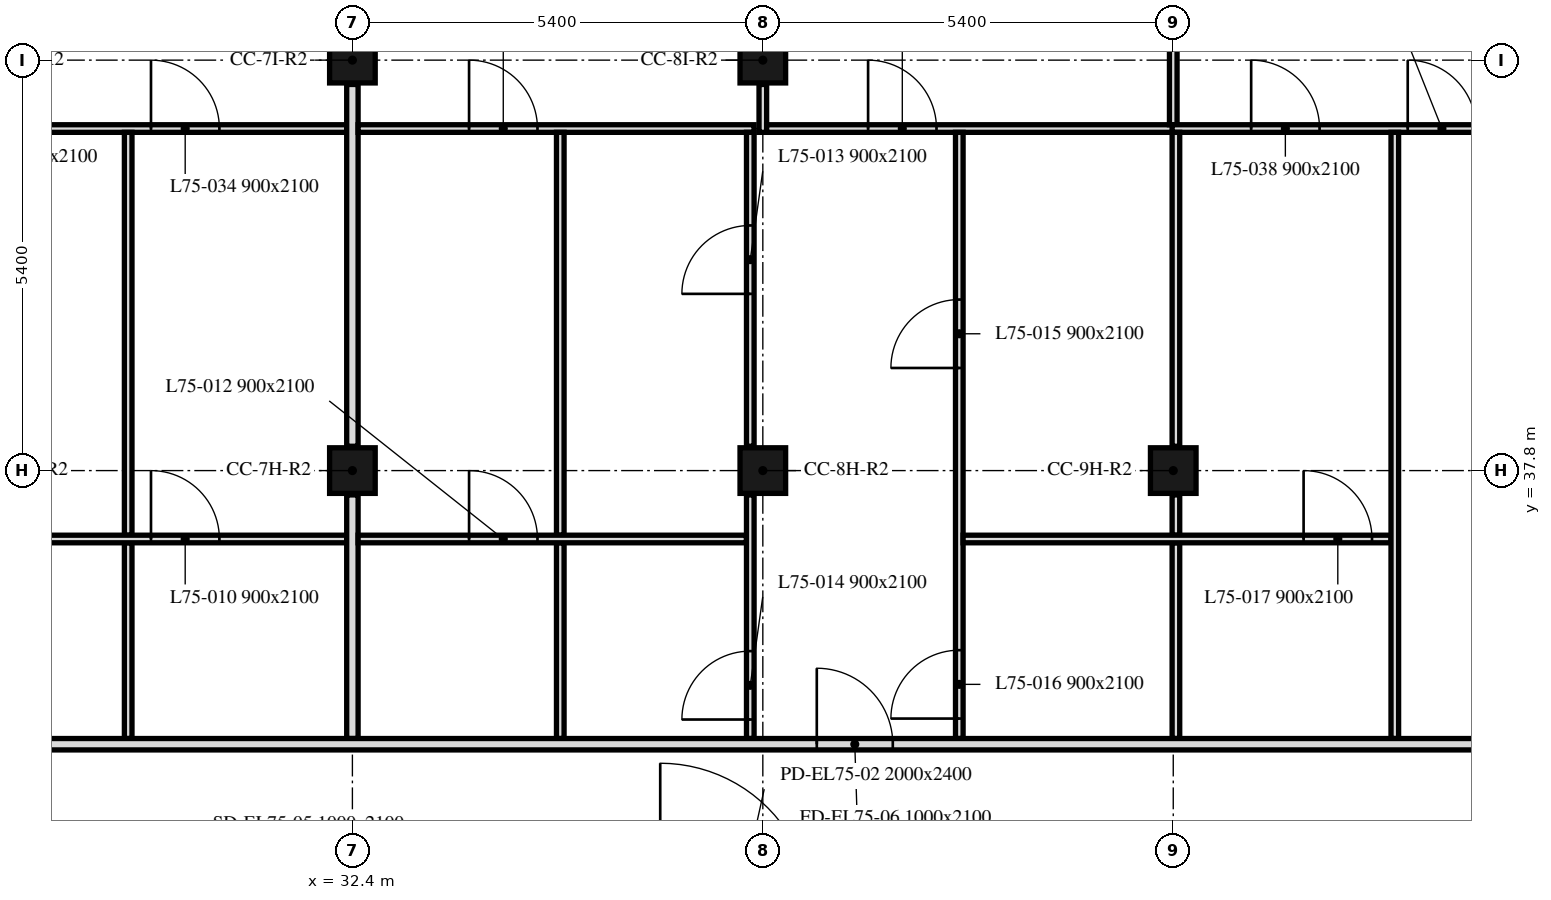
"""IFC4 building model, lengths in metres.
Left out: names, types, materials, properties, quantities, classifications, styles, units other than length and angle.
Written with IfcOpenShell. Run it as: python <this file> out.ifc"""

import sys

from ifc_helpers import new_model, si_unit, direction, frame, frame_2d, origin, origin_2d, place, context, subcontext, project, spatial, rectangle, extrude, element, fill, save


model = new_model("IFC4")
c1 = context("Model", 3, precision=1e-05, world=origin(), true_north=direction((0.0, 1.0)))
c2 = subcontext(c1, "Body", "Model", "MODEL_VIEW")
j1 = project(units=[si_unit("LENGTHUNIT", "METRE"), si_unit("PLANEANGLEUNIT", "RADIAN")], contexts=[c1])
p1 = place(None, origin())
s1 = spatial("IfcSite", under=j1, at=p1, CompositionType="ELEMENT")
p2 = place(p1, origin())
s2 = spatial("IfcBuilding", under=s1, at=p2, CompositionType="ELEMENT")
p3 = place(p2, frame((0.0, 0.0, 301.6)))
s3 = spatial("IfcBuildingStorey", under=s2, at=p3, CompositionType="ELEMENT", Elevation=301.6)
for number, where, z_axis, x_axis in (
    (1, (32.4, 37.8, 0.0), (0.0, 0.0, 1.0), (1.0, 0.0, 0.0)),
    (2, (37.8, 37.8, 0.0), (0.0, 0.0, 1.0), (1.0, 0.0, 0.0)),
    (3, (43.2, 37.8, 0.0), (0.0, 0.0, 1.0), (1.0, 0.0, 0.0)),
    (4, (32.4, 43.2, 0.0), (0.0, 0.0, 1.0), (1.0, 0.0, 0.0)),
    (5, (37.8, 43.2, 0.0), (0.0, 0.0, 1.0), (1.0, 0.0, 0.0)),
):
    element("IfcColumn", number, at=place(p3, frame(where, z_axis=z_axis, x_axis=x_axis)), inside=s3, PredefinedType="COLUMN", context=c2, shape_type="SweptSolid", body=[
        extrude(rectangle(XDim=0.6, YDim=0.6, at=origin_2d()), origin(), (0.0, 0.0, 1.0), 3.0),
    ])
p4 = place(p3, frame((47.901, 43.051, 0.0), z_axis=(0.0, 0.0, 1.0), x_axis=(-0.707106781187, 0.707106781187, 0.0)))
e6 = element("IfcWall", 6, at=p4, inside=s3, PredefinedType="SOLIDWALL", context=c2, shape_type="SweptSolid", body=[
    extrude(rectangle(XDim=6.86, YDim=0.3, at=frame_2d((3.43, 0.0))), origin(), (0.0, 0.0, 1.0), 3.0),
])
p5 = place(p4, frame((1.73, 0.0, 0.9)))
e7 = element("IfcOpeningElement", 7, at=p5, cuts=e6, PredefinedType="OPENING", context=c2, shape_type="SweptSolid", body=[
    extrude(rectangle(XDim=3.4, YDim=1.7, at=frame_2d((1.7, 0.85))), frame((0.0, 0.16, 0.0), z_axis=(0.0, -1.0, 0.0), x_axis=(1.0, 0.0, 0.0)), (0.0, 0.0, 1.0), 0.32),
])
p6 = place(p3, frame((27.05, 42.3, 0.0), z_axis=(0.0, 0.0, 1.0), x_axis=(1.0, 0.0, 0.0)))
e8 = element("IfcWall", 8, at=p6, inside=s3, PredefinedType="PARTITIONING", context=c2, shape_type="SweptSolid", body=[
    extrude(rectangle(XDim=5.275, YDim=0.1, at=frame_2d((2.637, 0.0))), origin(), (0.0, 0.0, 1.0), 3.0),
])
p7 = place(p6, frame((2.7, 0.0, 0.0)))
e9 = element("IfcOpeningElement", 9, at=p7, cuts=e8, PredefinedType="OPENING", context=c2, shape_type="SweptSolid", body=[
    extrude(rectangle(XDim=0.9, YDim=2.1, at=frame_2d((0.45, 1.05))), frame((0.0, 0.05, 0.0), z_axis=(0.0, -1.0, 0.0), x_axis=(1.0, 0.0, 0.0)), (0.0, 0.0, 1.0), 0.1),
])
p8 = place(p3, frame((29.45, 36.95, 0.0), z_axis=(0.0, 0.0, 1.0), x_axis=(0.0, 1.0, 0.0)))
e10 = element("IfcWall", 10, at=p8, inside=s3, PredefinedType="PARTITIONING", context=c2, shape_type="SweptSolid", body=[
    extrude(rectangle(XDim=5.3, YDim=0.1, at=frame_2d((2.65, 0.0))), origin(), (0.0, 0.0, 1.0), 3.0),
])
p9 = place(p3, frame((29.45, 34.275, 0.0), z_axis=(0.0, 0.0, 1.0), x_axis=(0.0, 1.0, 0.0)))
e11 = element("IfcWall", 11, at=p9, inside=s3, PredefinedType="PARTITIONING", context=c2, shape_type="SweptSolid", body=[
    extrude(rectangle(XDim=2.575, YDim=0.1, at=frame_2d((1.288, 0.0))), origin(), (0.0, 0.0, 1.0), 3.0),
])
p10 = place(p3, frame((26.772, 36.9, 0.0), z_axis=(0.0, 0.0, 1.0), x_axis=(1.0, 0.0, 0.0)))
e12 = element("IfcWall", 12, at=p10, inside=s3, PredefinedType="PARTITIONING", context=c2, shape_type="SweptSolid", body=[
    extrude(rectangle(XDim=5.553, YDim=0.1, at=frame_2d((2.776, 0.0))), origin(), (0.0, 0.0, 1.0), 2.4),
])
p11 = place(p10, frame((2.978, 0.0, 0.0)))
e13 = element("IfcOpeningElement", 13, at=p11, cuts=e12, PredefinedType="OPENING", context=c2, shape_type="SweptSolid", body=[
    extrude(rectangle(XDim=0.9, YDim=2.1, at=frame_2d((0.45, 1.05))), frame((0.0, 0.05, 0.0), z_axis=(0.0, -1.0, 0.0), x_axis=(1.0, 0.0, 0.0)), (0.0, 0.0, 1.0), 0.1),
])
p12 = place(p3, frame((32.4, 38.12, 0.0), z_axis=(0.0, 0.0, 1.0), x_axis=(0.0, 1.0, 0.0)))
e14 = element("IfcWall", 14, at=p12, inside=s3, PredefinedType="PARTITIONING", context=c2, shape_type="SweptSolid", body=[
    extrude(rectangle(XDim=4.76, YDim=0.15, at=frame_2d((2.38, 0.0))), origin(), (0.0, 0.0, 1.0), 2.4),
])
p13 = place(p3, frame((32.4, 34.275, 0.0), z_axis=(0.0, 0.0, 1.0), x_axis=(0.0, 1.0, 0.0)))
e15 = element("IfcWall", 15, at=p13, inside=s3, PredefinedType="PARTITIONING", context=c2, shape_type="SweptSolid", body=[
    extrude(rectangle(XDim=3.205, YDim=0.15, at=frame_2d((1.603, 0.0))), origin(), (0.0, 0.0, 1.0), 2.4),
])
p14 = place(p3, frame((32.475, 42.3, 0.0), z_axis=(0.0, 0.0, 1.0), x_axis=(1.0, 0.0, 0.0)))
e16 = element("IfcWall", 16, at=p14, inside=s3, PredefinedType="PARTITIONING", context=c2, shape_type="SweptSolid", body=[
    extrude(rectangle(XDim=5.21, YDim=0.1, at=frame_2d((2.605, 0.0))), origin(), (0.0, 0.0, 1.0), 3.0),
])
p15 = place(p14, frame((1.46, 0.0, 0.0)))
e17 = element("IfcOpeningElement", 17, at=p15, cuts=e16, PredefinedType="OPENING", context=c2, shape_type="SweptSolid", body=[
    extrude(rectangle(XDim=0.9, YDim=2.1, at=frame_2d((0.45, 1.05))), frame((0.0, 0.05, 0.0), z_axis=(0.0, -1.0, 0.0), x_axis=(1.0, 0.0, 0.0)), (0.0, 0.0, 1.0), 0.1),
])
p16 = place(p3, frame((37.8, 42.25, 0.0), z_axis=(0.0, 0.0, 1.0), x_axis=(0.0, 1.0, 0.0)))
e18 = element("IfcWall", 18, at=p16, inside=s3, PredefinedType="PARTITIONING", context=c2, shape_type="SweptSolid", body=[
    extrude(rectangle(XDim=0.63, YDim=0.1, at=frame_2d((0.315, 0.0))), origin(), (0.0, 0.0, 1.0), 2.4),
])
p17 = place(p3, frame((37.85, 42.3, 0.0), z_axis=(0.0, 0.0, 1.0), x_axis=(1.0, 0.0, 0.0)))
e19 = element("IfcWall", 19, at=p17, inside=s3, PredefinedType="PARTITIONING", context=c2, shape_type="SweptSolid", body=[
    extrude(rectangle(XDim=5.4, YDim=0.1, at=frame_2d((2.7, 0.0))), origin(), (0.0, 0.0, 1.0), 3.0),
])
p18 = place(p17, frame((1.335, 0.0, 0.0)))
e20 = element("IfcOpeningElement", 20, at=p18, cuts=e19, PredefinedType="OPENING", context=c2, shape_type="SweptSolid", body=[
    extrude(rectangle(XDim=0.9, YDim=2.1, at=frame_2d((0.45, 1.05))), frame((0.0, 0.05, 0.0), z_axis=(0.0, -1.0, 0.0), x_axis=(1.0, 0.0, 0.0)), (0.0, 0.0, 1.0), 0.1),
])
p19 = place(p3, frame((43.2, 42.35, 0.0), z_axis=(0.0, 0.0, 1.0), x_axis=(0.0, 1.0, 0.0)))
e21 = element("IfcWall", 21, at=p19, inside=s3, PredefinedType="PARTITIONING", context=c2, shape_type="SweptSolid", body=[
    extrude(rectangle(XDim=5.138, YDim=0.1, at=frame_2d((2.569, 0.0))), origin(), (0.0, 0.0, 1.0), 3.0),
])
p20 = place(p19, frame((2.65, 0.0, 0.0)))
e22 = element("IfcOpeningElement", 22, at=p20, cuts=e21, PredefinedType="OPENING", context=c2, shape_type="SweptSolid", body=[
    extrude(rectangle(XDim=0.9, YDim=2.1, at=frame_2d((0.45, 1.05))), frame((0.0, 0.05, 0.0), z_axis=(0.0, -1.0, 0.0), x_axis=(1.0, 0.0, 0.0)), (0.0, 0.0, 1.0), 0.1),
])
p21 = place(p3, frame((43.185, 42.3, 0.0), z_axis=(0.0, 0.0, 1.0), x_axis=(1.0, 0.0, 0.0)))
e23 = element("IfcWall", 23, at=p21, inside=s3, PredefinedType="PARTITIONING", context=c2, shape_type="SweptSolid", body=[
    extrude(rectangle(XDim=4.664, YDim=0.1, at=frame_2d((2.332, 0.0))), origin(), (0.0, 0.0, 1.0), 3.0),
])
p22 = place(p21, frame((3.1, 0.0, 0.0)))
e24 = element("IfcOpeningElement", 24, at=p22, cuts=e23, PredefinedType="OPENING", context=c2, shape_type="SweptSolid", body=[
    extrude(rectangle(XDim=0.9, YDim=2.1, at=frame_2d((0.45, 1.05))), frame((0.0, 0.05, 0.0), z_axis=(0.0, -1.0, 0.0), x_axis=(1.0, 0.0, 0.0)), (0.0, 0.0, 1.0), 0.1),
])
p23 = place(p21, frame((1.04, 0.0, 0.0)))
e25 = element("IfcOpeningElement", 25, at=p23, cuts=e23, PredefinedType="OPENING", context=c2, shape_type="SweptSolid", body=[
    extrude(rectangle(XDim=0.9, YDim=2.1, at=frame_2d((0.45, 1.05))), frame((0.0, 0.05, 0.0), z_axis=(0.0, -1.0, 0.0), x_axis=(1.0, 0.0, 0.0)), (0.0, 0.0, 1.0), 0.1),
])
p24 = place(p3, frame((35.135, 36.95, 0.0), z_axis=(0.0, 0.0, 1.0), x_axis=(0.0, 1.0, 0.0)))
e26 = element("IfcWall", 26, at=p24, inside=s3, PredefinedType="PARTITIONING", context=c2, shape_type="SweptSolid", body=[
    extrude(rectangle(XDim=5.3, YDim=0.1, at=frame_2d((2.65, 0.0))), origin(), (0.0, 0.0, 1.0), 2.4),
])
p25 = place(p3, frame((35.135, 34.275, 0.0), z_axis=(0.0, 0.0, 1.0), x_axis=(0.0, 1.0, 0.0)))
e27 = element("IfcWall", 27, at=p25, inside=s3, PredefinedType="PARTITIONING", context=c2, shape_type="SweptSolid", body=[
    extrude(rectangle(XDim=2.575, YDim=0.1, at=frame_2d((1.288, 0.0))), origin(), (0.0, 0.0, 1.0), 3.0),
])
p26 = place(p3, frame((32.475, 36.9, 0.0), z_axis=(0.0, 0.0, 1.0), x_axis=(1.0, 0.0, 0.0)))
e28 = element("IfcWall", 28, at=p26, inside=s3, PredefinedType="PARTITIONING", context=c2, shape_type="SweptSolid", body=[
    extrude(rectangle(XDim=5.11, YDim=0.1, at=frame_2d((2.555, 0.0))), origin(), (0.0, 0.0, 1.0), 3.0),
])
p27 = place(p26, frame((1.46, 0.0, 0.0)))
e29 = element("IfcOpeningElement", 29, at=p27, cuts=e28, PredefinedType="OPENING", context=c2, shape_type="SweptSolid", body=[
    extrude(rectangle(XDim=0.9, YDim=2.1, at=frame_2d((0.45, 1.05))), frame((0.0, 0.05, 0.0), z_axis=(0.0, -1.0, 0.0), x_axis=(1.0, 0.0, 0.0)), (0.0, 0.0, 1.0), 0.1),
])
p28 = place(p3, frame((37.635, 38.12, 0.0), z_axis=(0.0, 0.0, 1.0), x_axis=(0.0, 1.0, 0.0)))
e30 = element("IfcWall", 30, at=p28, inside=s3, PredefinedType="PARTITIONING", context=c2, shape_type="SweptSolid", body=[
    extrude(rectangle(XDim=4.13, YDim=0.1, at=frame_2d((2.065, 0.0))), origin(), (0.0, 0.0, 1.0), 2.4),
])
p29 = place(p28, frame((2.005, 0.0, 0.0)))
e31 = element("IfcOpeningElement", 31, at=p29, cuts=e30, PredefinedType="OPENING", context=c2, shape_type="SweptSolid", body=[
    extrude(rectangle(XDim=0.9, YDim=2.1, at=frame_2d((0.45, 1.05))), frame((0.0, 0.05, 0.0), z_axis=(0.0, -1.0, 0.0), x_axis=(1.0, 0.0, 0.0)), (0.0, 0.0, 1.0), 0.1),
])
p30 = place(p3, frame((37.635, 34.275, 0.0), z_axis=(0.0, 0.0, 1.0), x_axis=(0.0, 1.0, 0.0)))
e32 = element("IfcWall", 32, at=p30, inside=s3, PredefinedType="PARTITIONING", context=c2, shape_type="SweptSolid", body=[
    extrude(rectangle(XDim=3.205, YDim=0.1, at=frame_2d((1.603, 0.0))), origin(), (0.0, 0.0, 1.0), 2.4),
])
p31 = place(p30, frame((0.25, 0.0, 0.0)))
e33 = element("IfcOpeningElement", 33, at=p31, cuts=e32, PredefinedType="OPENING", context=c2, shape_type="SweptSolid", body=[
    extrude(rectangle(XDim=0.9, YDim=2.1, at=frame_2d((0.45, 1.05))), frame((0.0, 0.05, 0.0), z_axis=(0.0, -1.0, 0.0), x_axis=(1.0, 0.0, 0.0)), (0.0, 0.0, 1.0), 0.1),
])
p32 = place(p3, frame((40.385, 34.275, 0.0), z_axis=(0.0, 0.0, 1.0), x_axis=(0.0, 1.0, 0.0)))
e34 = element("IfcWall", 34, at=p32, inside=s3, PredefinedType="PARTITIONING", context=c2, shape_type="SweptSolid", body=[
    extrude(rectangle(XDim=7.975, YDim=0.1, at=frame_2d((3.988, 0.0))), origin(), (0.0, 0.0, 1.0), 2.4),
])
p33 = place(p32, frame((4.875, 0.0, 0.0)))
e35 = element("IfcOpeningElement", 35, at=p33, cuts=e34, PredefinedType="OPENING", context=c2, shape_type="SweptSolid", body=[
    extrude(rectangle(XDim=0.9, YDim=2.1, at=frame_2d((0.45, 1.05))), frame((0.0, 0.05, 0.0), z_axis=(0.0, -1.0, 0.0), x_axis=(1.0, 0.0, 0.0)), (0.0, 0.0, 1.0), 0.1),
])
p34 = place(p32, frame((0.262, 0.0, 0.0)))
e36 = element("IfcOpeningElement", 36, at=p34, cuts=e34, PredefinedType="OPENING", context=c2, shape_type="SweptSolid", body=[
    extrude(rectangle(XDim=0.9, YDim=2.1, at=frame_2d((0.45, 1.05))), frame((0.0, 0.05, 0.0), z_axis=(0.0, -1.0, 0.0), x_axis=(1.0, 0.0, 0.0)), (0.0, 0.0, 1.0), 0.1),
])
p35 = place(p3, frame((43.235, 36.95, 0.0), z_axis=(0.0, 0.0, 1.0), x_axis=(0.0, 1.0, 0.0)))
e37 = element("IfcWall", 37, at=p35, inside=s3, PredefinedType="PARTITIONING", context=c2, shape_type="SweptSolid", body=[
    extrude(rectangle(XDim=0.53, YDim=0.1, at=frame_2d((0.265, 0.0))), origin(), (0.0, 0.0, 1.0), 3.0),
])
p36 = place(p3, frame((43.235, 38.12, 0.0), z_axis=(0.0, 0.0, 1.0), x_axis=(0.0, 1.0, 0.0)))
e38 = element("IfcWall", 38, at=p36, inside=s3, PredefinedType="PARTITIONING", context=c2, shape_type="SweptSolid", body=[
    extrude(rectangle(XDim=4.13, YDim=0.1, at=frame_2d((2.065, 0.0))), origin(), (0.0, 0.0, 1.0), 3.0),
])
p37 = place(p3, frame((43.235, 34.275, 0.0), z_axis=(0.0, 0.0, 1.0), x_axis=(0.0, 1.0, 0.0)))
e39 = element("IfcWall", 39, at=p37, inside=s3, PredefinedType="PARTITIONING", context=c2, shape_type="SweptSolid", body=[
    extrude(rectangle(XDim=2.575, YDim=0.1, at=frame_2d((1.288, 0.0))), origin(), (0.0, 0.0, 1.0), 3.0),
])
p38 = place(p3, frame((40.435, 36.9, 0.0), z_axis=(0.0, 0.0, 1.0), x_axis=(1.0, 0.0, 0.0)))
e40 = element("IfcWall", 40, at=p38, inside=s3, PredefinedType="PARTITIONING", context=c2, shape_type="SweptSolid", body=[
    extrude(rectangle(XDim=5.63, YDim=0.1, at=frame_2d((2.815, 0.0))), origin(), (0.0, 0.0, 1.0), 3.0),
])
p39 = place(p38, frame((4.48, 0.0, 0.0)))
e41 = element("IfcOpeningElement", 41, at=p39, cuts=e40, PredefinedType="OPENING", context=c2, shape_type="SweptSolid", body=[
    extrude(rectangle(XDim=0.9, YDim=2.1, at=frame_2d((0.45, 1.05))), frame((0.0, 0.05, 0.0), z_axis=(0.0, -1.0, 0.0), x_axis=(1.0, 0.0, 0.0)), (0.0, 0.0, 1.0), 0.1),
])
p40 = place(p3, frame((46.115, 34.275, 0.0), z_axis=(0.0, 0.0, 1.0), x_axis=(0.0, 1.0, 0.0)))
e42 = element("IfcWall", 42, at=p40, inside=s3, PredefinedType="PARTITIONING", context=c2, shape_type="SweptSolid", body=[
    extrude(rectangle(XDim=7.975, YDim=0.1, at=frame_2d((3.988, 0.0))), origin(), (0.0, 0.0, 1.0), 2.4),
])
p41 = place(p3, frame((6.151, 34.2, 0.0), z_axis=(0.0, 0.0, 1.0), x_axis=(1.0, 0.0, 0.0)))
e43 = element("IfcWall", 43, at=p41, inside=s3, PredefinedType="PARTITIONING", context=c2, shape_type="SweptSolid", body=[
    extrude(rectangle(XDim=41.698, YDim=0.15, at=frame_2d((20.849, 0.0))), origin(), (0.0, 0.0, 1.0), 2.4),
])
p42 = place(p41, frame((2.939, 0.0, 0.0)))
e44 = element("IfcOpeningElement", 44, at=p42, cuts=e43, PredefinedType="OPENING", context=c2, shape_type="SweptSolid", body=[
    extrude(rectangle(XDim=1.0, YDim=2.1, at=frame_2d((0.5, 1.05))), frame((0.0, 0.075, 0.0), z_axis=(0.0, -1.0, 0.0), x_axis=(1.0, 0.0, 0.0)), (0.0, 0.0, 1.0), 0.15),
])
p43 = place(p41, frame((18.121, 0.0, 0.0)))
e45 = element("IfcOpeningElement", 45, at=p43, cuts=e43, PredefinedType="OPENING", context=c2, shape_type="SweptSolid", body=[
    extrude(rectangle(XDim=1.0, YDim=2.1, at=frame_2d((0.5, 1.05))), frame((0.0, 0.075, 0.0), z_axis=(0.0, -1.0, 0.0), x_axis=(1.0, 0.0, 0.0)), (0.0, 0.0, 1.0), 0.15),
])
p44 = place(p41, frame((32.359, 0.0, 0.0)))
e46 = element("IfcOpeningElement", 46, at=p44, cuts=e43, PredefinedType="OPENING", context=c2, shape_type="SweptSolid", body=[
    extrude(rectangle(XDim=1.0, YDim=2.1, at=frame_2d((0.5, 1.05))), frame((0.0, 0.075, 0.0), z_axis=(0.0, -1.0, 0.0), x_axis=(1.0, 0.0, 0.0)), (0.0, 0.0, 1.0), 0.15),
])
p45 = place(p11, origin())
e47 = element("IfcDoor", 47, at=p45, inside=s3, OperationType="SINGLE_SWING_LEFT", PredefinedType="DOOR", context=c2, shape_type="SweptSolid", body=[
    extrude(rectangle(XDim=0.9, YDim=2.1, at=frame_2d((0.45, 1.05))), frame((0.0, 0.025, 0.0), z_axis=(0.0, -1.0, 0.0), x_axis=(1.0, 0.0, 0.0)), (0.0, 0.0, 1.0), 0.05),
])
fill(e13, e47)
p46 = place(p22, origin())
e48 = element("IfcDoor", 48, at=p46, inside=s3, OperationType="SINGLE_SWING_LEFT", PredefinedType="DOOR", context=c2, shape_type="SweptSolid", body=[
    extrude(rectangle(XDim=0.9, YDim=2.1, at=frame_2d((0.45, 1.05))), frame((0.0, 0.025, 0.0), z_axis=(0.0, -1.0, 0.0), x_axis=(1.0, 0.0, 0.0)), (0.0, 0.0, 1.0), 0.05),
])
fill(e24, e48)
p47 = place(p27, origin())
e49 = element("IfcDoor", 49, at=p47, inside=s3, OperationType="SINGLE_SWING_LEFT", PredefinedType="DOOR", context=c2, shape_type="SweptSolid", body=[
    extrude(rectangle(XDim=0.9, YDim=2.1, at=frame_2d((0.45, 1.05))), frame((0.0, 0.025, 0.0), z_axis=(0.0, -1.0, 0.0), x_axis=(1.0, 0.0, 0.0)), (0.0, 0.0, 1.0), 0.05),
])
fill(e29, e49)
p48 = place(p29, origin())
e50 = element("IfcDoor", 50, at=p48, inside=s3, OperationType="SINGLE_SWING_RIGHT", PredefinedType="DOOR", context=c2, shape_type="SweptSolid", body=[
    extrude(rectangle(XDim=0.9, YDim=2.1, at=frame_2d((0.45, 1.05))), frame((0.0, 0.025, 0.0), z_axis=(0.0, -1.0, 0.0), x_axis=(1.0, 0.0, 0.0)), (0.0, 0.0, 1.0), 0.05),
])
fill(e31, e50)
p49 = place(p31, origin())
e51 = element("IfcDoor", 51, at=p49, inside=s3, OperationType="SINGLE_SWING_LEFT", PredefinedType="DOOR", context=c2, shape_type="SweptSolid", body=[
    extrude(rectangle(XDim=0.9, YDim=2.1, at=frame_2d((0.45, 1.05))), frame((0.0, 0.025, 0.0), z_axis=(0.0, -1.0, 0.0), x_axis=(1.0, 0.0, 0.0)), (0.0, 0.0, 1.0), 0.05),
])
fill(e33, e51)
p50 = place(p33, origin())
e52 = element("IfcDoor", 52, at=p50, inside=s3, OperationType="SINGLE_SWING_LEFT", PredefinedType="DOOR", context=c2, shape_type="SweptSolid", body=[
    extrude(rectangle(XDim=0.9, YDim=2.1, at=frame_2d((0.45, 1.05))), frame((0.0, 0.025, 0.0), z_axis=(0.0, -1.0, 0.0), x_axis=(1.0, 0.0, 0.0)), (0.0, 0.0, 1.0), 0.05),
])
fill(e35, e52)
p51 = place(p34, origin())
e53 = element("IfcDoor", 53, at=p51, inside=s3, OperationType="SINGLE_SWING_LEFT", PredefinedType="DOOR", context=c2, shape_type="SweptSolid", body=[
    extrude(rectangle(XDim=0.9, YDim=2.1, at=frame_2d((0.45, 1.05))), frame((0.0, 0.025, 0.0), z_axis=(0.0, -1.0, 0.0), x_axis=(1.0, 0.0, 0.0)), (0.0, 0.0, 1.0), 0.05),
])
fill(e36, e53)
p52 = place(p39, origin())
e54 = element("IfcDoor", 54, at=p52, inside=s3, OperationType="SINGLE_SWING_LEFT", PredefinedType="DOOR", context=c2, shape_type="SweptSolid", body=[
    extrude(rectangle(XDim=0.9, YDim=2.1, at=frame_2d((0.45, 1.05))), frame((0.0, 0.025, 0.0), z_axis=(0.0, -1.0, 0.0), x_axis=(1.0, 0.0, 0.0)), (0.0, 0.0, 1.0), 0.05),
])
fill(e41, e54)
p53 = place(p7, origin())
e55 = element("IfcDoor", 55, at=p53, inside=s3, OperationType="SINGLE_SWING_RIGHT", PredefinedType="DOOR", context=c2, shape_type="SweptSolid", body=[
    extrude(rectangle(XDim=0.9, YDim=2.1, at=frame_2d((0.45, 1.05))), frame((0.0, 0.025, 0.0), z_axis=(0.0, -1.0, 0.0), x_axis=(1.0, 0.0, 0.0)), (0.0, 0.0, 1.0), 0.05),
])
fill(e9, e55)
p54 = place(p15, origin())
e56 = element("IfcDoor", 56, at=p54, inside=s3, OperationType="SINGLE_SWING_LEFT", PredefinedType="DOOR", context=c2, shape_type="SweptSolid", body=[
    extrude(rectangle(XDim=0.9, YDim=2.1, at=frame_2d((0.45, 1.05))), frame((0.0, 0.025, 0.0), z_axis=(0.0, -1.0, 0.0), x_axis=(1.0, 0.0, 0.0)), (0.0, 0.0, 1.0), 0.05),
])
fill(e17, e56)
p55 = place(p23, origin())
e57 = element("IfcDoor", 57, at=p55, inside=s3, OperationType="SINGLE_SWING_RIGHT", PredefinedType="DOOR", context=c2, shape_type="SweptSolid", body=[
    extrude(rectangle(XDim=0.9, YDim=2.1, at=frame_2d((0.45, 1.05))), frame((0.0, 0.025, 0.0), z_axis=(0.0, -1.0, 0.0), x_axis=(1.0, 0.0, 0.0)), (0.0, 0.0, 1.0), 0.05),
])
fill(e25, e57)
p56 = place(p18, origin())
e58 = element("IfcDoor", 58, at=p56, inside=s3, OperationType="SINGLE_SWING_LEFT", PredefinedType="DOOR", context=c2, shape_type="SweptSolid", body=[
    extrude(rectangle(XDim=0.9, YDim=2.1, at=frame_2d((0.45, 1.05))), frame((0.0, 0.025, 0.0), z_axis=(0.0, -1.0, 0.0), x_axis=(1.0, 0.0, 0.0)), (0.0, 0.0, 1.0), 0.05),
])
fill(e20, e58)
p57 = place(p44, origin())
e59 = element("IfcDoor", 59, at=p57, inside=s3, OperationType="SINGLE_SWING_LEFT", PredefinedType="DOOR", context=c2, shape_type="SweptSolid", body=[
    extrude(rectangle(XDim=1.0, YDim=2.1, at=frame_2d((0.5, 1.05))), frame((0.0, 0.025, 0.0), z_axis=(0.0, -1.0, 0.0), x_axis=(1.0, 0.0, 0.0)), (0.0, 0.0, 1.0), 0.05),
])
fill(e46, e59)
save(model, sys.argv[1])
